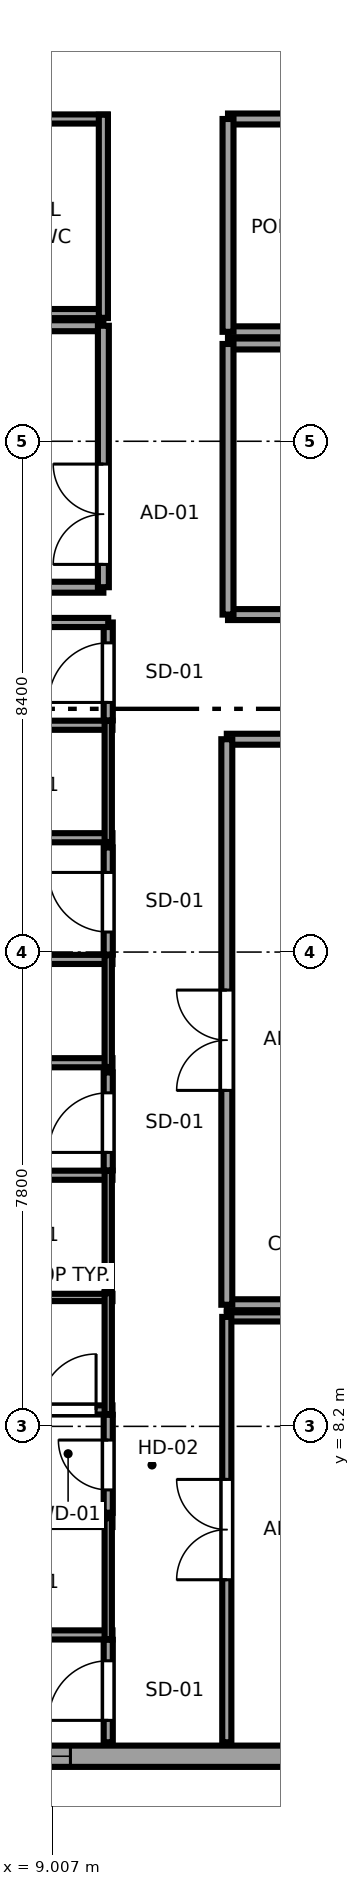
"""IFC4 building model, lengths in metres.
Left out: names, types, materials, properties, quantities, classifications, styles, units other than length and angle.
Written with IfcOpenShell. Run it as: python <this file> out.ifc"""

import sys

from ifc_helpers import new_model, si_unit, direction, frame, frame_2d, origin, place, context, subcontext, project, spatial, rectangle, extrude, source, transform, mapped, element, fill, save


model = new_model("IFC4")
c1 = context("Model", 3, precision=1e-05, world=origin(), true_north=direction((0.0, 1.0)))
c2 = subcontext(c1, "Body", "Model", "MODEL_VIEW")
j1 = project(units=[si_unit("LENGTHUNIT", "METRE"), si_unit("PLANEANGLEUNIT", "RADIAN")], contexts=[c1])
p1 = place(None, origin())
s1 = spatial("IfcSite", under=j1, at=p1, CompositionType="ELEMENT")
p2 = place(p1, origin())
s2 = spatial("IfcBuilding", under=s1, at=p2, CompositionType="ELEMENT")
p3 = place(p2, frame((0.0, 0.0, 266.5)))
s3 = spatial("IfcBuildingStorey", under=s2, at=p3, CompositionType="ELEMENT", Elevation=266.5)
p4 = place(p3, frame((7.017, 2.775, 0.0), z_axis=(0.0, 0.0, 1.0), x_axis=(1.0, 0.0, 0.0)))
e1 = element("IfcWall", 1, at=p4, inside=s3, PredefinedType="SOLIDWALL", context=c2, shape_type="SweptSolid", body=[
    extrude(rectangle(XDim=8.008, YDim=0.35, at=frame_2d((4.004, 0.0))), origin(), (0.0, 0.0, 1.0), 3.25),
])
p5 = place(p4, frame((0.791, 0.0, 0.62)))
e2 = element("IfcOpeningElement", 2, at=p5, cuts=e1, PredefinedType="OPENING", context=c2, shape_type="SweptSolid", body=[
    extrude(rectangle(XDim=1.5, YDim=1.55, at=frame_2d((0.75, 0.775))), frame((0.0, 0.185, 0.0), z_axis=(0.0, -1.0, 0.0), x_axis=(1.0, 0.0, 0.0)), (0.0, 0.0, 1.0), 0.37),
])
for number, where, z_axis, x_axis in (
    (3, (7.41, 4.77, 0.0), (0.0, 0.0, 1.0), (1.0, 0.0, 0.0)),
    (4, (7.41, 6.62, 0.0), (0.0, 0.0, 1.0), (1.0, 0.0, 0.0)),
):
    element("IfcWall", number, at=place(p3, frame(where, z_axis=z_axis, x_axis=x_axis)), inside=s3, PredefinedType="PARTITIONING", context=c2, shape_type="SweptSolid", body=[
        extrude(rectangle(XDim=2.59, YDim=0.15, at=frame_2d((1.295, 0.0))), origin(), (0.0, 0.0, 1.0), 3.25),
    ])
p6 = place(p3, frame((9.93, 4.7, 0.0), z_axis=(0.0, 0.0, 1.0), x_axis=(0.0, 1.0, 0.0)))
e5 = element("IfcWall", 5, at=p6, inside=s3, PredefinedType="PLUMBINGWALL", context=c2, shape_type="SweptSolid", body=[
    extrude(rectangle(XDim=1.99, YDim=0.12, at=frame_2d((0.995, 0.0))), origin(), (0.0, 0.0, 1.0), 3.25),
])
p7 = place(p3, frame((7.41, 8.47, 0.0), z_axis=(0.0, 0.0, 1.0), x_axis=(1.0, 0.0, 0.0)))
e6 = element("IfcWall", 6, at=p7, inside=s3, PredefinedType="PARTITIONING", context=c2, shape_type="SweptSolid", body=[
    extrude(rectangle(XDim=2.59, YDim=0.15, at=frame_2d((1.295, 0.0))), origin(), (0.0, 0.0, 1.0), 2.04),
])
p8 = place(p7, frame((1.4, 0.0, 0.0)))
e7 = element("IfcOpeningElement", 7, at=p8, cuts=e6, PredefinedType="OPENING", context=c2, shape_type="SweptSolid", body=[
    extrude(rectangle(XDim=0.92, YDim=2.01, at=frame_2d((0.46, 1.005))), frame((0.0, 0.085, 0.0), z_axis=(0.0, -1.0, 0.0), x_axis=(1.0, 0.0, 0.0)), (0.0, 0.0, 1.0), 0.17),
])
p9 = place(p3, frame((7.41, 10.32, 0.0), z_axis=(0.0, 0.0, 1.0), x_axis=(1.0, 0.0, 0.0)))
e8 = element("IfcWall", 8, at=p9, inside=s3, PredefinedType="PLUMBINGWALL", context=c2, shape_type="SweptSolid", body=[
    extrude(rectangle(XDim=2.59, YDim=0.12, at=frame_2d((1.295, 0.0))), origin(), (0.0, 0.0, 1.0), 3.25),
])
p10 = place(p3, frame((9.93, 8.4, 0.0), z_axis=(0.0, 0.0, 1.0), x_axis=(0.0, 1.0, 0.0)))
e9 = element("IfcWall", 9, at=p10, inside=s3, PredefinedType="PLUMBINGWALL", context=c2, shape_type="SweptSolid", body=[
    extrude(rectangle(XDim=1.99, YDim=0.12, at=frame_2d((0.995, 0.0))), origin(), (0.0, 0.0, 1.0), 3.25),
])
p11 = place(p3, frame((7.41, 12.33, 0.0), z_axis=(0.0, 0.0, 1.0), x_axis=(1.0, 0.0, 0.0)))
e10 = element("IfcWall", 10, at=p11, inside=s3, PredefinedType="PARTITIONING", context=c2, shape_type="SweptSolid", body=[
    extrude(rectangle(XDim=2.59, YDim=0.15, at=frame_2d((1.295, 0.0))), origin(), (0.0, 0.0, 1.0), 3.25),
])
p12 = place(p3, frame((9.93, 10.41, 0.0), z_axis=(0.0, 0.0, 1.0), x_axis=(0.0, 1.0, 0.0)))
e11 = element("IfcWall", 11, at=p12, inside=s3, PredefinedType="PLUMBINGWALL", context=c2, shape_type="SweptSolid", body=[
    extrude(rectangle(XDim=1.99, YDim=0.12, at=frame_2d((0.995, 0.0))), origin(), (0.0, 0.0, 1.0), 3.25),
])
p13 = place(p3, frame((3.005, 14.18, 0.0), z_axis=(0.0, 0.0, 1.0), x_axis=(1.0, 0.0, 0.0)))
e12 = element("IfcWall", 12, at=p13, inside=s3, PredefinedType="PARTITIONING", context=c2, shape_type="SweptSolid", body=[
    extrude(rectangle(XDim=6.995, YDim=0.15, at=frame_2d((3.498, 0.0))), origin(), (0.0, 0.0, 1.0), 3.25),
])
p14 = place(p3, frame((6.486, 15.879, 0.0), z_axis=(0.0, 0.0, 1.0), x_axis=(1.0, 0.0, 0.0)))
e13 = element("IfcWall", 13, at=p14, inside=s3, PredefinedType="PARTITIONING", context=c2, shape_type="SweptSolid", body=[
    extrude(rectangle(XDim=3.514, YDim=0.15, at=frame_2d((1.757, 0.0))), origin(), (0.0, 0.0, 1.0), 2.04),
])
p15 = place(p3, frame((9.93, 14.11, 0.0), z_axis=(0.0, 0.0, 1.0), x_axis=(0.0, 1.0, 0.0)))
e14 = element("IfcWall", 14, at=p15, inside=s3, PredefinedType="PLUMBINGWALL", context=c2, shape_type="SweptSolid", body=[
    extrude(rectangle(XDim=1.839, YDim=0.12, at=frame_2d((0.919, 0.0))), origin(), (0.0, 0.0, 1.0), 3.25),
])
p16 = place(p3, frame((3.005, 17.88, 0.0), z_axis=(0.0, 0.0, 1.0), x_axis=(1.0, 0.0, 0.0)))
e15 = element("IfcWall", 15, at=p16, inside=s3, PredefinedType="PARTITIONING", context=c2, shape_type="SweptSolid", body=[
    extrude(rectangle(XDim=6.995, YDim=0.15, at=frame_2d((3.498, 0.0))), origin(), (0.0, 0.0, 1.0), 3.25),
])
p17 = place(p3, frame((7.41, 19.73, 0.0), z_axis=(0.0, 0.0, 1.0), x_axis=(1.0, 0.0, 0.0)))
e16 = element("IfcWall", 16, at=p17, inside=s3, PredefinedType="PARTITIONING", context=c2, shape_type="SweptSolid", body=[
    extrude(rectangle(XDim=2.59, YDim=0.15, at=frame_2d((1.295, 0.0))), origin(), (0.0, 0.0, 1.0), 3.25),
])
p18 = place(p3, frame((9.93, 17.81, 0.0), z_axis=(0.0, 0.0, 1.0), x_axis=(0.0, 1.0, 0.0)))
e17 = element("IfcWall", 17, at=p18, inside=s3, PredefinedType="PLUMBINGWALL", context=c2, shape_type="SweptSolid", body=[
    extrude(rectangle(XDim=1.99, YDim=0.12, at=frame_2d((0.995, 0.0))), origin(), (0.0, 0.0, 1.0), 3.25),
])
p19 = place(p3, frame((9.93, 3.005, 0.0), z_axis=(0.0, 0.0, 1.0), x_axis=(0.0, 1.0, 0.0)))
e18 = element("IfcWall", 18, at=p19, inside=s3, PredefinedType="PARTITIONING", context=c2, shape_type="SweptSolid", body=[
    extrude(rectangle(XDim=1.685, YDim=0.15, at=frame_2d((0.843, 0.0))), origin(), (0.0, 0.0, 1.0), 3.25),
])
p20 = place(p19, frame((0.36, 0.0, 0.0)))
e19 = element("IfcOpeningElement", 19, at=p20, cuts=e18, PredefinedType="OPENING", context=c2, shape_type="SweptSolid", body=[
    extrude(rectangle(XDim=0.98, YDim=2.12, at=frame_2d((0.49, 1.06))), frame((0.0, 0.085, 0.0), z_axis=(0.0, -1.0, 0.0), x_axis=(1.0, 0.0, 0.0)), (0.0, 0.0, 1.0), 0.17),
])
p21 = place(p3, frame((9.93, 6.78, 0.0), z_axis=(0.0, 0.0, 1.0), x_axis=(0.0, 1.0, 0.0)))
e20 = element("IfcWall", 20, at=p21, inside=s3, PredefinedType="PARTITIONING", context=c2, shape_type="SweptSolid", body=[
    extrude(rectangle(XDim=1.61, YDim=0.15, at=frame_2d((0.805, 0.0))), origin(), (0.0, 0.0, 1.0), 3.25),
])
p22 = place(p21, frame((0.375, 0.0, 0.0)))
e21 = element("IfcOpeningElement", 21, at=p22, cuts=e20, PredefinedType="OPENING", context=c2, shape_type="SweptSolid", body=[
    extrude(rectangle(XDim=0.82, YDim=2.01, at=frame_2d((0.41, 1.005))), frame((0.0, 0.085, 0.0), z_axis=(0.0, -1.0, 0.0), x_axis=(1.0, 0.0, 0.0)), (0.0, 0.0, 1.0), 0.17),
])
p23 = place(p3, frame((9.93, 12.41, 0.0), z_axis=(0.0, 0.0, 1.0), x_axis=(0.0, 1.0, 0.0)))
e22 = element("IfcWall", 22, at=p23, inside=s3, PredefinedType="PARTITIONING", context=c2, shape_type="SweptSolid", body=[
    extrude(rectangle(XDim=1.61, YDim=0.15, at=frame_2d((0.805, 0.0))), origin(), (0.0, 0.0, 1.0), 3.25),
])
p24 = place(p23, frame((0.295, 0.0, 0.0)))
e23 = element("IfcOpeningElement", 23, at=p24, cuts=e22, PredefinedType="OPENING", context=c2, shape_type="SweptSolid", body=[
    extrude(rectangle(XDim=0.98, YDim=2.12, at=frame_2d((0.49, 1.06))), frame((0.0, 0.085, 0.0), z_axis=(0.0, -1.0, 0.0), x_axis=(1.0, 0.0, 0.0)), (0.0, 0.0, 1.0), 0.17),
])
p25 = place(p3, frame((9.93, 15.959, 0.0), z_axis=(0.0, 0.0, 1.0), x_axis=(0.0, 1.0, 0.0)))
e24 = element("IfcWall", 24, at=p25, inside=s3, PredefinedType="PARTITIONING", context=c2, shape_type="SweptSolid", body=[
    extrude(rectangle(XDim=1.761, YDim=0.15, at=frame_2d((0.88, 0.0))), origin(), (0.0, 0.0, 1.0), 3.25),
])
p26 = place(p25, frame((0.371, 0.0, 0.0)))
e25 = element("IfcOpeningElement", 25, at=p26, cuts=e24, PredefinedType="OPENING", context=c2, shape_type="SweptSolid", body=[
    extrude(rectangle(XDim=0.98, YDim=2.12, at=frame_2d((0.49, 1.06))), frame((0.0, 0.085, 0.0), z_axis=(0.0, -1.0, 0.0), x_axis=(1.0, 0.0, 0.0)), (0.0, 0.0, 1.0), 0.17),
])
p27 = place(p3, frame((9.93, 19.81, 0.0), z_axis=(0.0, 0.0, 1.0), x_axis=(0.0, 1.0, 0.0)))
e26 = element("IfcWall", 26, at=p27, inside=s3, PredefinedType="PARTITIONING", context=c2, shape_type="SweptSolid", body=[
    extrude(rectangle(XDim=1.61, YDim=0.15, at=frame_2d((0.805, 0.0))), origin(), (0.0, 0.0, 1.0), 3.25),
])
p28 = place(p27, frame((0.295, 0.0, 0.0)))
e27 = element("IfcOpeningElement", 27, at=p28, cuts=e26, PredefinedType="OPENING", context=c2, shape_type="SweptSolid", body=[
    extrude(rectangle(XDim=0.98, YDim=2.12, at=frame_2d((0.49, 1.06))), frame((0.0, 0.085, 0.0), z_axis=(0.0, -1.0, 0.0), x_axis=(1.0, 0.0, 0.0)), (0.0, 0.0, 1.0), 0.17),
])
p29 = place(p3, frame((3.005, 21.42, 0.0), z_axis=(0.0, 0.0, 1.0), x_axis=(1.0, 0.0, 0.0)))
e28 = element("IfcWall", 28, at=p29, inside=s3, PredefinedType="PARTITIONING", context=c2, shape_type="SweptSolid", body=[
    extrude(rectangle(XDim=6.925, YDim=0.15, at=frame_2d((3.462, 0.0))), origin(), (0.0, 0.0, 1.0), 3.25),
])
for number, where, z_axis, x_axis in (
    (29, (11.88, 10.2, 0.0), (0.0, 0.0, 1.0), (1.0, 0.0, 0.0)),
    (30, (11.88, 19.5, 0.0), (0.0, 0.0, 1.0), (1.0, 0.0, 0.0)),
):
    element("IfcWall", number, at=place(p3, frame(where, z_axis=z_axis, x_axis=x_axis)), inside=s3, PredefinedType="PARTITIONING", context=c2, shape_type="SweptSolid", body=[
        extrude(rectangle(XDim=2.97, YDim=0.18, at=frame_2d((1.485, 0.0))), origin(), (0.0, 0.0, 1.0), 3.25),
    ])
p30 = place(p3, frame((11.88, 10.2, 0.0), z_axis=(0.0, 0.0, 1.0), x_axis=(0.0, 1.0, 0.0)))
e31 = element("IfcWall", 31, at=p30, inside=s3, PredefinedType="PARTITIONING", context=c2, shape_type="SweptSolid", body=[
    extrude(rectangle(XDim=9.3, YDim=0.18, at=frame_2d((4.65, 0.0))), origin(), (0.0, 0.0, 1.0), 3.25),
])
p31 = place(p30, frame((3.525, 0.0, 0.0)))
e32 = element("IfcOpeningElement", 32, at=p31, cuts=e31, PredefinedType="OPENING", context=c2, shape_type="SweptSolid", body=[
    extrude(rectangle(XDim=1.65, YDim=2.15, at=frame_2d((0.825, 1.075))), frame((0.0, 0.1, 0.0), z_axis=(0.0, -1.0, 0.0), x_axis=(1.0, 0.0, 0.0)), (0.0, 0.0, 1.0), 0.2),
])
p32 = place(p3, frame((11.88, 10.0, 0.0), z_axis=(0.0, 0.0, 1.0), x_axis=(1.0, 0.0, 0.0)))
e33 = element("IfcWall", 33, at=p32, inside=s3, PredefinedType="PARTITIONING", context=c2, shape_type="SweptSolid", body=[
    extrude(rectangle(XDim=2.97, YDim=0.15, at=frame_2d((1.485, 0.0))), origin(), (0.0, 0.0, 1.0), 3.25),
])
p33 = place(p3, frame((11.88, 3.005, 0.0), z_axis=(0.0, 0.0, 1.0), x_axis=(0.0, 1.0, 0.0)))
e34 = element("IfcWall", 34, at=p33, inside=s3, PredefinedType="PARTITIONING", context=c2, shape_type="SweptSolid", body=[
    extrude(rectangle(XDim=6.995, YDim=0.15, at=frame_2d((3.498, 0.0))), origin(), (0.0, 0.0, 1.0), 3.25),
])
p34 = place(p33, frame((2.673, 0.0, 0.0)))
e35 = element("IfcOpeningElement", 35, at=p34, cuts=e34, PredefinedType="OPENING", context=c2, shape_type="SweptSolid", body=[
    extrude(rectangle(XDim=1.65, YDim=2.15, at=frame_2d((0.825, 1.075))), frame((0.0, 0.085, 0.0), z_axis=(0.0, -1.0, 0.0), x_axis=(1.0, 0.0, 0.0)), (0.0, 0.0, 1.0), 0.17),
])
p35 = place(p3, frame((11.9, 21.55, 0.0), z_axis=(0.0, 0.0, 1.0), x_axis=(1.0, 0.0, 0.0)))
e36 = element("IfcWall", 36, at=p35, inside=s3, PredefinedType="PARTITIONING", context=c2, shape_type="SweptSolid", body=[
    extrude(rectangle(XDim=20.9, YDim=0.18, at=frame_2d((10.45, 0.0))), origin(), (0.0, 0.0, 1.0), 3.25),
])
p36 = place(p35, frame((10.575, 0.0, 0.0)))
e37 = element("IfcOpeningElement", 37, at=p36, cuts=e36, PredefinedType="OPENING", context=c2, shape_type="SweptSolid", body=[
    extrude(rectangle(XDim=1.65, YDim=2.15, at=frame_2d((0.825, 1.075))), frame((0.0, 0.1, 0.0), z_axis=(0.0, -1.0, 0.0), x_axis=(1.0, 0.0, 0.0)), (0.0, 0.0, 1.0), 0.2),
])
p37 = place(p3, frame((11.9, 26.0, 0.0), z_axis=(0.0, 0.0, 1.0), x_axis=(1.0, 0.0, 0.0)))
e38 = element("IfcWall", 38, at=p37, inside=s3, PredefinedType="PARTITIONING", context=c2, shape_type="SweptSolid", body=[
    extrude(rectangle(XDim=20.9, YDim=0.18, at=frame_2d((10.45, 0.0))), origin(), (0.0, 0.0, 1.0), 3.25),
])
p38 = place(p3, frame((11.9, 21.55, 0.0), z_axis=(0.0, 0.0, 1.0), x_axis=(0.0, 1.0, 0.0)))
e39 = element("IfcWall", 39, at=p38, inside=s3, PredefinedType="PARTITIONING", context=c2, shape_type="SweptSolid", body=[
    extrude(rectangle(XDim=4.45, YDim=0.18, at=frame_2d((2.225, 0.0))), origin(), (0.0, 0.0, 1.0), 3.25),
])
p39 = place(p3, frame((11.9, 26.2, 0.0), z_axis=(0.0, 0.0, 1.0), x_axis=(1.0, 0.0, 0.0)))
e40 = element("IfcWall", 40, at=p39, inside=s3, PredefinedType="PARTITIONING", context=c2, shape_type="SweptSolid", body=[
    extrude(rectangle(XDim=20.9, YDim=0.18, at=frame_2d((10.45, 0.0))), origin(), (0.0, 0.0, 1.0), 3.25),
])
p40 = place(p3, frame((11.9, 29.7, 0.0), z_axis=(0.0, 0.0, 1.0), x_axis=(1.0, 0.0, 0.0)))
e41 = element("IfcWall", 41, at=p40, inside=s3, PredefinedType="PARTITIONING", context=c2, shape_type="SweptSolid", body=[
    extrude(rectangle(XDim=20.9, YDim=0.18, at=frame_2d((10.45, 0.0))), origin(), (0.0, 0.0, 1.0), 3.25),
])
p41 = place(p40, frame((10.575, 0.0, 0.0)))
e42 = element("IfcOpeningElement", 42, at=p41, cuts=e41, PredefinedType="OPENING", context=c2, shape_type="SweptSolid", body=[
    extrude(rectangle(XDim=1.65, YDim=2.15, at=frame_2d((0.825, 1.075))), frame((0.0, 0.1, 0.0), z_axis=(0.0, -1.0, 0.0), x_axis=(1.0, 0.0, 0.0)), (0.0, 0.0, 1.0), 0.2),
])
p42 = place(p3, frame((11.9, 26.2, 0.0), z_axis=(0.0, 0.0, 1.0), x_axis=(0.0, 1.0, 0.0)))
e43 = element("IfcWall", 43, at=p42, inside=s3, PredefinedType="PARTITIONING", context=c2, shape_type="SweptSolid", body=[
    extrude(rectangle(XDim=3.5, YDim=0.18, at=frame_2d((1.75, 0.0))), origin(), (0.0, 0.0, 1.0), 3.25),
])
for number, where, z_axis, x_axis in (
    (44, (3.005, 22.0, 0.0), (0.0, 0.0, 1.0), (1.0, 0.0, 0.0)),
    (45, (3.005, 26.3, 0.0), (0.0, 0.0, 1.0), (1.0, 0.0, 0.0)),
):
    element("IfcWall", number, at=place(p3, frame(where, z_axis=z_axis, x_axis=x_axis)), inside=s3, PredefinedType="PARTITIONING", context=c2, shape_type="SweptSolid", body=[
        extrude(rectangle(XDim=6.845, YDim=0.18, at=frame_2d((3.423, 0.0))), origin(), (0.0, 0.0, 1.0), 3.25),
    ])
p43 = place(p3, frame((9.85, 22.0, 0.0), z_axis=(0.0, 0.0, 1.0), x_axis=(0.0, 1.0, 0.0)))
e46 = element("IfcWall", 46, at=p43, inside=s3, PredefinedType="PARTITIONING", context=c2, shape_type="SweptSolid", body=[
    extrude(rectangle(XDim=4.3, YDim=0.18, at=frame_2d((2.15, 0.0))), origin(), (0.0, 0.0, 1.0), 3.25),
])
p44 = place(p43, frame((0.375, 0.0, 0.0)))
e47 = element("IfcOpeningElement", 47, at=p44, cuts=e46, PredefinedType="OPENING", context=c2, shape_type="SweptSolid", body=[
    extrude(rectangle(XDim=1.65, YDim=2.15, at=frame_2d((0.825, 1.075))), frame((0.0, 0.1, 0.0), z_axis=(0.0, -1.0, 0.0), x_axis=(1.0, 0.0, 0.0)), (0.0, 0.0, 1.0), 0.2),
])
p45 = place(p3, frame((6.13, 26.5, 0.0), z_axis=(0.0, 0.0, 1.0), x_axis=(1.0, 0.0, 0.0)))
e48 = element("IfcWall", 48, at=p45, inside=s3, PredefinedType="PARTITIONING", context=c2, shape_type="SweptSolid", body=[
    extrude(rectangle(XDim=3.79, YDim=0.15, at=frame_2d((1.895, 0.0))), origin(), (0.0, 0.0, 1.0), 3.25),
])
p46 = place(p3, frame((6.13, 29.7, 0.0), z_axis=(0.0, 0.0, 1.0), x_axis=(1.0, 0.0, 0.0)))
e49 = element("IfcWall", 49, at=p46, inside=s3, PredefinedType="PARTITIONING", context=c2, shape_type="SweptSolid", body=[
    extrude(rectangle(XDim=3.79, YDim=0.15, at=frame_2d((1.895, 0.0))), origin(), (0.0, 0.0, 1.0), 3.25),
])
p47 = place(p46, frame((1.435, 0.0, 0.0)))
e50 = element("IfcOpeningElement", 50, at=p47, cuts=e49, PredefinedType="OPENING", context=c2, shape_type="SweptSolid", body=[
    extrude(rectangle(XDim=0.92, YDim=2.01, at=frame_2d((0.46, 1.005))), frame((0.0, 0.085, 0.0), z_axis=(0.0, -1.0, 0.0), x_axis=(1.0, 0.0, 0.0)), (0.0, 0.0, 1.0), 0.17),
])
p48 = place(p3, frame((9.85, 26.43, 0.0), z_axis=(0.0, 0.0, 1.0), x_axis=(0.0, 1.0, 0.0)))
e51 = element("IfcWall", 51, at=p48, inside=s3, PredefinedType="PARTITIONING", context=c2, shape_type="SweptSolid", body=[
    extrude(rectangle(XDim=3.34, YDim=0.15, at=frame_2d((1.67, 0.0))), origin(), (0.0, 0.0, 1.0), 3.25),
])
m1 = source(origin(), c2, "Body", "SweptSolid", [
    extrude(rectangle(XDim=1.5, YDim=1.55, at=frame_2d((0.75, 0.775))), frame((0.0, 0.09, 0.0), z_axis=(0.0, -1.0, 0.0), x_axis=(1.0, 0.0, 0.0)), (0.0, 0.0, 1.0), 0.06),
])
p49 = place(p5, origin())
e52 = element("IfcWindow", 52, at=p49, inside=s3, PartitioningType="SINGLE_PANEL", PredefinedType="WINDOW", context=c2, shape_type="MappedRepresentation", body=[
    mapped(m1, transform((0.0, 0.0, 0.0), x_axis=(1.0, 0.0, 0.0), y_axis=(0.0, 1.0, 0.0), z_axis=(0.0, 0.0, 1.0), scale=1.0)),
])
fill(e2, e52)
m2 = source(origin(), c2, "Body", "SweptSolid", [
    extrude(rectangle(XDim=0.92, YDim=2.01, at=frame_2d((0.46, 1.005))), frame((0.0, 0.025, 0.0), z_axis=(0.0, -1.0, 0.0), x_axis=(1.0, 0.0, 0.0)), (0.0, 0.0, 1.0), 0.05),
])
p50 = place(p8, origin())
e53 = element("IfcDoor", 53, at=p50, inside=s3, OperationType="SINGLE_SWING_RIGHT", PredefinedType="DOOR", context=c2, shape_type="MappedRepresentation", body=[
    mapped(m2, transform((0.0, 0.0, 0.0), x_axis=(1.0, 0.0, 0.0), y_axis=(0.0, 1.0, 0.0), z_axis=(0.0, 0.0, 1.0), scale=1.0)),
])
fill(e7, e53)
m3 = source(origin(), c2, "Body", "SweptSolid", [
    extrude(rectangle(XDim=0.98, YDim=2.12, at=frame_2d((0.49, 1.06))), frame((0.0, 0.025, 0.0), z_axis=(0.0, -1.0, 0.0), x_axis=(1.0, 0.0, 0.0)), (0.0, 0.0, 1.0), 0.05),
])
p51 = place(p20, origin())
e54 = element("IfcDoor", 54, at=p51, inside=s3, OperationType="SINGLE_SWING_LEFT", PredefinedType="DOOR", context=c2, shape_type="MappedRepresentation", body=[
    mapped(m3, transform((0.0, 0.0, 0.0), x_axis=(1.0, 0.0, 0.0), y_axis=(0.0, 1.0, 0.0), z_axis=(0.0, 0.0, 1.0), scale=1.0)),
])
fill(e19, e54)
m4 = source(origin(), c2, "Body", "SweptSolid", [
    extrude(rectangle(XDim=0.82, YDim=2.01, at=frame_2d((0.41, 1.005))), frame((0.0, 0.025, 0.0), z_axis=(0.0, -1.0, 0.0), x_axis=(1.0, 0.0, 0.0)), (0.0, 0.0, 1.0), 0.05),
])
p52 = place(p22, origin())
e55 = element("IfcDoor", 55, at=p52, inside=s3, OperationType="SINGLE_SWING_RIGHT", PredefinedType="DOOR", context=c2, shape_type="MappedRepresentation", body=[
    mapped(m4, transform((0.0, 0.0, 0.0), x_axis=(1.0, 0.0, 0.0), y_axis=(0.0, 1.0, 0.0), z_axis=(0.0, 0.0, 1.0), scale=1.0)),
])
fill(e21, e55)
p53 = place(p24, origin())
e56 = element("IfcDoor", 56, at=p53, inside=s3, OperationType="SINGLE_SWING_LEFT", PredefinedType="DOOR", context=c2, shape_type="MappedRepresentation", body=[
    mapped(m3, transform((0.0, 0.0, 0.0), x_axis=(1.0, 0.0, 0.0), y_axis=(0.0, 1.0, 0.0), z_axis=(0.0, 0.0, 1.0), scale=1.0)),
])
fill(e23, e56)
p54 = place(p26, origin())
e57 = element("IfcDoor", 57, at=p54, inside=s3, OperationType="SINGLE_SWING_RIGHT", PredefinedType="DOOR", context=c2, shape_type="MappedRepresentation", body=[
    mapped(m3, transform((0.0, 0.0, 0.0), x_axis=(1.0, 0.0, 0.0), y_axis=(0.0, 1.0, 0.0), z_axis=(0.0, 0.0, 1.0), scale=1.0)),
])
fill(e25, e57)
p55 = place(p28, origin())
e58 = element("IfcDoor", 58, at=p55, inside=s3, OperationType="SINGLE_SWING_LEFT", PredefinedType="DOOR", context=c2, shape_type="MappedRepresentation", body=[
    mapped(m3, transform((0.0, 0.0, 0.0), x_axis=(1.0, 0.0, 0.0), y_axis=(0.0, 1.0, 0.0), z_axis=(0.0, 0.0, 1.0), scale=1.0)),
])
fill(e27, e58)
m5 = source(origin(), c2, "Body", "SweptSolid", [
    extrude(rectangle(XDim=1.65, YDim=2.15, at=frame_2d((0.825, 1.075))), frame((0.0, 0.025, 0.0), z_axis=(0.0, -1.0, 0.0), x_axis=(1.0, 0.0, 0.0)), (0.0, 0.0, 1.0), 0.05),
])
p56 = place(p31, origin())
e59 = element("IfcDoor", 59, at=p56, inside=s3, OperationType="DOUBLE_DOOR_SINGLE_SWING", PredefinedType="DOOR", context=c2, shape_type="MappedRepresentation", body=[
    mapped(m5, transform((0.0, 0.0, 0.0), x_axis=(1.0, 0.0, 0.0), y_axis=(0.0, 1.0, 0.0), z_axis=(0.0, 0.0, 1.0), scale=1.0)),
])
fill(e32, e59)
p57 = place(p34, origin())
e60 = element("IfcDoor", 60, at=p57, inside=s3, OperationType="DOUBLE_DOOR_SINGLE_SWING", PredefinedType="DOOR", context=c2, shape_type="MappedRepresentation", body=[
    mapped(m5, transform((0.0, 0.0, 0.0), x_axis=(1.0, 0.0, 0.0), y_axis=(0.0, 1.0, 0.0), z_axis=(0.0, 0.0, 1.0), scale=1.0)),
])
fill(e35, e60)
p58 = place(p44, origin())
e61 = element("IfcDoor", 61, at=p58, inside=s3, OperationType="DOUBLE_DOOR_SINGLE_SWING", PredefinedType="DOOR", context=c2, shape_type="MappedRepresentation", body=[
    mapped(m5, transform((0.0, 0.0, 0.0), x_axis=(1.0, 0.0, 0.0), y_axis=(0.0, 1.0, 0.0), z_axis=(0.0, 0.0, 1.0), scale=1.0)),
])
fill(e47, e61)
save(model, sys.argv[1])
